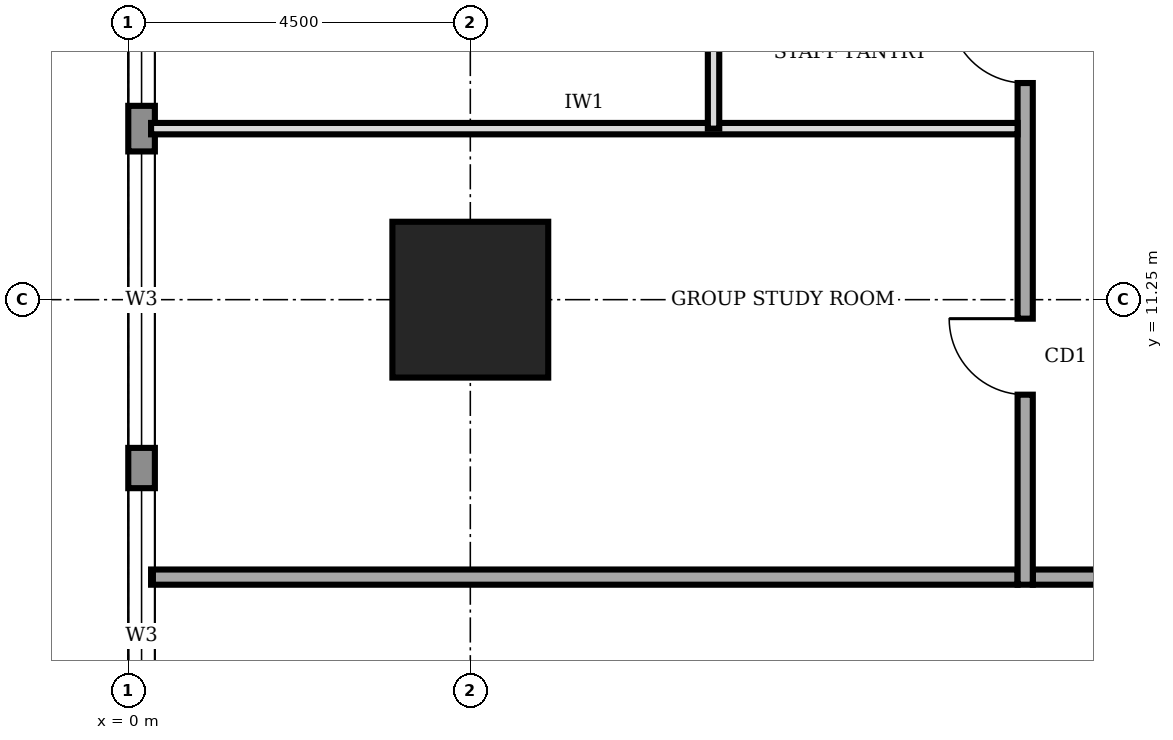
"""IFC4 building model, lengths in metres.
Left out: names, types, materials, properties, quantities, classifications, styles, units other than length and angle.
Written with IfcOpenShell. Run it as: python <this file> out.ifc"""

import sys

from ifc_helpers import new_model, si_unit, direction, frame, frame_2d, origin, origin_2d, place, context, subcontext, project, spatial, rectangle, extrude, element, fill, save


model = new_model("IFC4")
c1 = context("Model", 3, precision=1e-05, world=origin(), true_north=direction((0.0, 1.0)))
c2 = subcontext(c1, "Body", "Model", "MODEL_VIEW")
j1 = project(units=[si_unit("LENGTHUNIT", "METRE"), si_unit("PLANEANGLEUNIT", "RADIAN")], contexts=[c1])
p1 = place(None, origin())
s1 = spatial("IfcSite", under=j1, at=p1, CompositionType="ELEMENT")
p2 = place(p1, origin())
s2 = spatial("IfcBuilding", under=s1, at=p2, CompositionType="ELEMENT")
p3 = place(p2, frame((0.0, 0.0, 197.0)))
s3 = spatial("IfcBuildingStorey", under=s2, at=p3, CompositionType="ELEMENT", Elevation=197.0)
p4 = place(p3, frame((4.5, 11.25, 0.0), z_axis=(0.0, 0.0, 1.0), x_axis=(1.0, 0.0, 0.0)))
e1 = element("IfcColumn", 1, at=p4, inside=s3, PredefinedType="COLUMN", context=c2, shape_type="SweptSolid", body=[
    extrude(rectangle(XDim=2.05, YDim=2.05, at=origin_2d()), origin(), (0.0, 0.0, 1.0), 4.0),
])
p5 = place(p3, frame((0.175, 35.98, 0.0), z_axis=(0.0, 0.0, 1.0), x_axis=(0.0, -1.0, 0.0)))
e2 = element("IfcWall", 2, at=p5, inside=s3, PredefinedType="STANDARD", context=c2, shape_type="SweptSolid", body=[
    extrude(rectangle(XDim=31.46, YDim=0.35, at=frame_2d((15.73, 0.0))), origin(), (0.0, 0.0, 1.0), 3.75),
])
p6 = place(p5, frame((27.21, 0.0, 0.95)))
e3 = element("IfcOpeningElement", 3, at=p6, cuts=e2, PredefinedType="OPENING", context=c2, shape_type="SweptSolid", body=[
    extrude(rectangle(XDim=3.9, YDim=1.8, at=frame_2d((1.95, 0.9))), frame((0.0, 0.185, 0.0), z_axis=(0.0, -1.0, 0.0), x_axis=(1.0, 0.0, 0.0)), (0.0, 0.0, 1.0), 0.37),
])
p7 = place(p5, frame((22.78, 0.0, 0.95)))
e4 = element("IfcOpeningElement", 4, at=p7, cuts=e2, PredefinedType="OPENING", context=c2, shape_type="SweptSolid", body=[
    extrude(rectangle(XDim=3.9, YDim=1.8, at=frame_2d((1.95, 0.9))), frame((0.0, 0.185, 0.0), z_axis=(0.0, -1.0, 0.0), x_axis=(1.0, 0.0, 0.0)), (0.0, 0.0, 1.0), 0.37),
])
p8 = place(p5, frame((18.28, 0.0, 0.95)))
e5 = element("IfcOpeningElement", 5, at=p8, cuts=e2, PredefinedType="OPENING", context=c2, shape_type="SweptSolid", body=[
    extrude(rectangle(XDim=3.9, YDim=1.8, at=frame_2d((1.95, 0.9))), frame((0.0, 0.185, 0.0), z_axis=(0.0, -1.0, 0.0), x_axis=(1.0, 0.0, 0.0)), (0.0, 0.0, 1.0), 0.37),
])
p9 = place(p5, frame((13.78, 0.0, 0.95)))
e6 = element("IfcOpeningElement", 6, at=p9, cuts=e2, PredefinedType="OPENING", context=c2, shape_type="SweptSolid", body=[
    extrude(rectangle(XDim=3.9, YDim=1.8, at=frame_2d((1.95, 0.9))), frame((0.0, 0.185, 0.0), z_axis=(0.0, -1.0, 0.0), x_axis=(1.0, 0.0, 0.0)), (0.0, 0.0, 1.0), 0.37),
])
p10 = place(p5, frame((9.28, 0.0, 0.95)))
e7 = element("IfcOpeningElement", 7, at=p10, cuts=e2, PredefinedType="OPENING", context=c2, shape_type="SweptSolid", body=[
    extrude(rectangle(XDim=3.9, YDim=1.8, at=frame_2d((1.95, 0.9))), frame((0.0, 0.185, 0.0), z_axis=(0.0, -1.0, 0.0), x_axis=(1.0, 0.0, 0.0)), (0.0, 0.0, 1.0), 0.37),
])
p11 = place(p5, frame((4.78, 0.0, 0.95)))
e8 = element("IfcOpeningElement", 8, at=p11, cuts=e2, PredefinedType="OPENING", context=c2, shape_type="SweptSolid", body=[
    extrude(rectangle(XDim=3.9, YDim=1.8, at=frame_2d((1.95, 0.9))), frame((0.0, 0.185, 0.0), z_axis=(0.0, -1.0, 0.0), x_axis=(1.0, 0.0, 0.0)), (0.0, 0.0, 1.0), 0.37),
])
p12 = place(p3, frame((11.9, 7.6, 0.0), z_axis=(0.0, 0.0, 1.0), x_axis=(1.0, 0.0, 0.0)))
e9 = element("IfcWall", 9, at=p12, inside=s3, PredefinedType="SOLIDWALL", context=c2, shape_type="SweptSolid", body=[
    extrude(rectangle(XDim=16.9, YDim=0.2, at=frame_2d((8.45, 0.0))), origin(), (0.0, 0.0, 1.0), 3.75),
])
p13 = place(p12, frame((2.05, 0.0, 0.0)))
e10 = element("IfcOpeningElement", 10, at=p13, cuts=e9, PredefinedType="OPENING", context=c2, shape_type="SweptSolid", body=[
    extrude(rectangle(XDim=1.8, YDim=2.1, at=frame_2d((0.9, 1.05))), frame((0.0, 0.11, 0.0), z_axis=(0.0, -1.0, 0.0), x_axis=(1.0, 0.0, 0.0)), (0.0, 0.0, 1.0), 0.22),
])
p14 = place(p12, frame((7.85, 0.0, 0.0)))
e11 = element("IfcOpeningElement", 11, at=p14, cuts=e9, PredefinedType="OPENING", context=c2, shape_type="SweptSolid", body=[
    extrude(rectangle(XDim=1.0, YDim=2.1, at=frame_2d((0.5, 1.05))), frame((0.0, 0.11, 0.0), z_axis=(0.0, -1.0, 0.0), x_axis=(1.0, 0.0, 0.0)), (0.0, 0.0, 1.0), 0.22),
])
p15 = place(p12, frame((12.85, 0.0, 0.0)))
e12 = element("IfcOpeningElement", 12, at=p15, cuts=e9, PredefinedType="OPENING", context=c2, shape_type="SweptSolid", body=[
    extrude(rectangle(XDim=1.8, YDim=2.1, at=frame_2d((0.9, 1.05))), frame((0.0, 0.11, 0.0), z_axis=(0.0, -1.0, 0.0), x_axis=(1.0, 0.0, 0.0)), (0.0, 0.0, 1.0), 0.22),
])
p16 = place(p3, frame((11.8, 32.8, 0.0), z_axis=(0.0, 0.0, 1.0), x_axis=(0.0, -1.0, 0.0)))
e13 = element("IfcWall", 13, at=p16, inside=s3, PredefinedType="SOLIDWALL", context=c2, shape_type="SweptSolid", body=[
    extrude(rectangle(XDim=25.3, YDim=0.2, at=frame_2d((12.65, 0.0))), origin(), (0.0, 0.0, 1.0), 3.75),
])
p17 = place(p16, frame((21.8, 0.0, 0.0)))
e14 = element("IfcOpeningElement", 14, at=p17, cuts=e13, PredefinedType="OPENING", context=c2, shape_type="SweptSolid", body=[
    extrude(rectangle(XDim=1.0, YDim=2.1, at=frame_2d((0.5, 1.05))), frame((0.0, 0.11, 0.0), z_axis=(0.0, -1.0, 0.0), x_axis=(1.0, 0.0, 0.0)), (0.0, 0.0, 1.0), 0.22),
])
p18 = place(p16, frame((17.7, 0.0, 0.0)))
e15 = element("IfcOpeningElement", 15, at=p18, cuts=e13, PredefinedType="OPENING", context=c2, shape_type="SweptSolid", body=[
    extrude(rectangle(XDim=1.0, YDim=2.1, at=frame_2d((0.5, 1.05))), frame((0.0, 0.11, 0.0), z_axis=(0.0, -1.0, 0.0), x_axis=(1.0, 0.0, 0.0)), (0.0, 0.0, 1.0), 0.22),
])
p19 = place(p16, frame((14.7, 0.0, 0.0)))
e16 = element("IfcOpeningElement", 16, at=p19, cuts=e13, PredefinedType="OPENING", context=c2, shape_type="SweptSolid", body=[
    extrude(rectangle(XDim=0.9, YDim=2.1, at=frame_2d((0.45, 1.05))), frame((0.0, 0.11, 0.0), z_axis=(0.0, -1.0, 0.0), x_axis=(1.0, 0.0, 0.0)), (0.0, 0.0, 1.0), 0.22),
])
p20 = place(p16, frame((11.65, 0.0, 0.0)))
e17 = element("IfcOpeningElement", 17, at=p20, cuts=e13, PredefinedType="OPENING", context=c2, shape_type="SweptSolid", body=[
    extrude(rectangle(XDim=0.9, YDim=2.1, at=frame_2d((0.45, 1.05))), frame((0.0, 0.11, 0.0), z_axis=(0.0, -1.0, 0.0), x_axis=(1.0, 0.0, 0.0)), (0.0, 0.0, 1.0), 0.22),
])
p21 = place(p16, frame((6.95, 0.0, 0.0)))
e18 = element("IfcOpeningElement", 18, at=p21, cuts=e13, PredefinedType="OPENING", context=c2, shape_type="SweptSolid", body=[
    extrude(rectangle(XDim=0.9, YDim=2.1, at=frame_2d((0.45, 1.05))), frame((0.0, 0.11, 0.0), z_axis=(0.0, -1.0, 0.0), x_axis=(1.0, 0.0, 0.0)), (0.0, 0.0, 1.0), 0.22),
])
p22 = place(p16, frame((9.5, 0.0, 0.0)))
e19 = element("IfcOpeningElement", 19, at=p22, cuts=e13, PredefinedType="OPENING", context=c2, shape_type="SweptSolid", body=[
    extrude(rectangle(XDim=1.0, YDim=2.1, at=frame_2d((0.5, 1.05))), frame((0.0, 0.11, 0.0), z_axis=(0.0, -1.0, 0.0), x_axis=(1.0, 0.0, 0.0)), (0.0, 0.0, 1.0), 0.22),
])
p23 = place(p16, frame((2.3, 0.0, 0.0)))
e20 = element("IfcOpeningElement", 20, at=p23, cuts=e13, PredefinedType="OPENING", context=c2, shape_type="SweptSolid", body=[
    extrude(rectangle(XDim=1.0, YDim=2.1, at=frame_2d((0.5, 1.05))), frame((0.0, 0.11, 0.0), z_axis=(0.0, -1.0, 0.0), x_axis=(1.0, 0.0, 0.0)), (0.0, 0.0, 1.0), 0.22),
])
p24 = place(p3, frame((0.3, 7.6, 0.0), z_axis=(0.0, 0.0, 1.0), x_axis=(1.0, 0.0, 0.0)))
e21 = element("IfcWall", 21, at=p24, inside=s3, PredefinedType="SOLIDWALL", context=c2, shape_type="SweptSolid", body=[
    extrude(rectangle(XDim=11.4, YDim=0.2, at=frame_2d((5.7, 0.0))), origin(), (0.0, 0.0, 1.0), 3.75),
])
p25 = place(p3, frame((0.3, 13.5, 0.0), z_axis=(0.0, 0.0, 1.0), x_axis=(1.0, 0.0, 0.0)))
e22 = element("IfcWall", 22, at=p25, inside=s3, PredefinedType="PARTITIONING", context=c2, shape_type="SweptSolid", body=[
    extrude(rectangle(XDim=11.4, YDim=0.15, at=frame_2d((5.7, 0.0))), origin(), (0.0, 0.0, 1.0), 3.75),
])
p26 = place(p3, frame((7.7, 13.5, 0.0), z_axis=(0.0, 0.0, 1.0), x_axis=(0.0, 1.0, 0.0)))
e23 = element("IfcWall", 23, at=p26, inside=s3, PredefinedType="PARTITIONING", context=c2, shape_type="SweptSolid", body=[
    extrude(rectangle(XDim=2.2, YDim=0.15, at=frame_2d((1.1, 0.0))), origin(), (0.0, 0.0, 1.0), 3.75),
])
p27 = place(p6, origin())
e24 = element("IfcWindow", 24, at=p27, inside=s3, PartitioningType="SINGLE_PANEL", PredefinedType="WINDOW", context=c2, shape_type="SweptSolid", body=[
    extrude(rectangle(XDim=3.9, YDim=1.8, at=frame_2d((1.95, 0.9))), frame((0.0, 0.03, 0.0), z_axis=(0.0, -1.0, 0.0), x_axis=(1.0, 0.0, 0.0)), (0.0, 0.0, 1.0), 0.06),
])
fill(e3, e24)
p28 = place(p7, origin())
e25 = element("IfcWindow", 25, at=p28, inside=s3, PartitioningType="SINGLE_PANEL", PredefinedType="WINDOW", context=c2, shape_type="SweptSolid", body=[
    extrude(rectangle(XDim=3.9, YDim=1.8, at=frame_2d((1.95, 0.9))), frame((0.0, 0.03, 0.0), z_axis=(0.0, -1.0, 0.0), x_axis=(1.0, 0.0, 0.0)), (0.0, 0.0, 1.0), 0.06),
])
fill(e4, e25)
p29 = place(p8, origin())
e26 = element("IfcWindow", 26, at=p29, inside=s3, PartitioningType="SINGLE_PANEL", PredefinedType="WINDOW", context=c2, shape_type="SweptSolid", body=[
    extrude(rectangle(XDim=3.9, YDim=1.8, at=frame_2d((1.95, 0.9))), frame((0.0, 0.03, 0.0), z_axis=(0.0, -1.0, 0.0), x_axis=(1.0, 0.0, 0.0)), (0.0, 0.0, 1.0), 0.06),
])
fill(e5, e26)
p30 = place(p17, frame((1.0, 0.0, 0.0), z_axis=(0.0, 0.0, 1.0), x_axis=(-1.0, 0.0, 0.0)))
e27 = element("IfcDoor", 27, at=p30, inside=s3, OperationType="SINGLE_SWING_RIGHT", PredefinedType="DOOR", context=c2, shape_type="SweptSolid", body=[
    extrude(rectangle(XDim=1.0, YDim=2.1, at=frame_2d((0.5, 1.05))), frame((0.0, 0.025, 0.0), z_axis=(0.0, -1.0, 0.0), x_axis=(1.0, 0.0, 0.0)), (0.0, 0.0, 1.0), 0.05),
])
fill(e14, e27)
p31 = place(p18, frame((1.0, 0.0, 0.0), z_axis=(0.0, 0.0, 1.0), x_axis=(-1.0, 0.0, 0.0)))
e28 = element("IfcDoor", 28, at=p31, inside=s3, OperationType="SINGLE_SWING_RIGHT", PredefinedType="DOOR", context=c2, shape_type="SweptSolid", body=[
    extrude(rectangle(XDim=1.0, YDim=2.1, at=frame_2d((0.5, 1.05))), frame((0.0, 0.025, 0.0), z_axis=(0.0, -1.0, 0.0), x_axis=(1.0, 0.0, 0.0)), (0.0, 0.0, 1.0), 0.05),
])
fill(e15, e28)
save(model, sys.argv[1])
